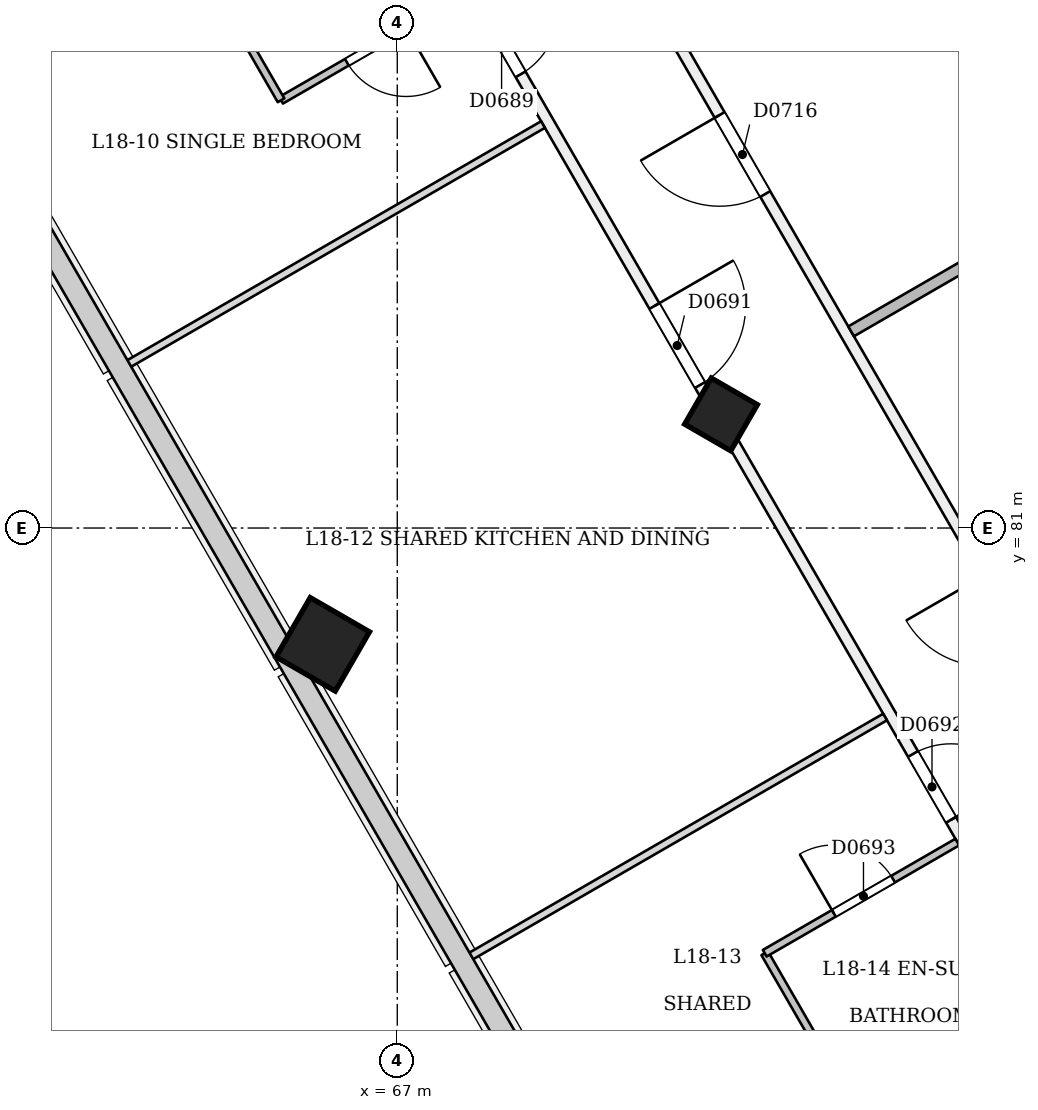
"""IFC4 building model, lengths in metres.
Left out: names, types, materials, properties, quantities, classifications, styles, units other than length and angle.
Written with IfcOpenShell. Run it as: python <this file> out.ifc"""

import sys

from ifc_helpers import new_model, si_unit, direction, frame, frame_2d, origin, origin_2d, place, context, subcontext, project, spatial, rectangle, extrude, element, fill, save


model = new_model("IFC4")
c1 = context("Model", 3, precision=1e-05, world=origin(), true_north=direction((0.0, 1.0)))
c2 = subcontext(c1, "Body", "Model", "MODEL_VIEW")
j1 = project(units=[si_unit("LENGTHUNIT", "METRE"), si_unit("PLANEANGLEUNIT", "RADIAN")], contexts=[c1])
p1 = place(None, origin())
s1 = spatial("IfcSite", under=j1, at=p1, CompositionType="ELEMENT")
p2 = place(p1, origin())
s2 = spatial("IfcBuilding", under=s1, at=p2, CompositionType="ELEMENT")
p3 = place(p2, frame((0.0, 0.0, 73.8)))
s3 = spatial("IfcBuildingStorey", under=s2, at=p3, CompositionType="ELEMENT", Elevation=73.8)
p4 = place(p3, frame((71.232, 82.448, -0.021), z_axis=(0.022222910879, 0.038415824599, 0.999014697916), x_axis=(-0.866021331072, -0.498527657424, 0.038434735731)))
e1 = element("IfcColumn", 1, at=p4, inside=s3, PredefinedType="COLUMN", context=c2, shape_type="SweptSolid", body=[
    extrude(rectangle(XDim=0.7, YDim=0.7, at=origin_2d()), origin(), (0.0, 0.0, 1.0), 3.604),
])
p5 = place(p3, frame((65.992, 79.422, -0.027), z_axis=(0.02222134892, 0.038480872521, 0.999012229206), x_axis=(-0.865639418776, -0.499186807044, 0.038482831667)))
e2 = element("IfcColumn", 2, at=p5, inside=s3, PredefinedType="COLUMN", context=c2, shape_type="SweptSolid", body=[
    extrude(rectangle(XDim=0.9, YDim=0.9, at=origin_2d()), origin(), (0.0, 0.0, 1.0), 3.604),
])
p6 = place(p3, frame((66.732, 90.242, 0.0), z_axis=(0.0, 0.0, 1.0), x_axis=(0.500004906105, -0.866022571225, 0.0)))
e3 = element("IfcWall", 3, at=p6, inside=s3, PredefinedType="PARTITIONING", context=c2, shape_type="SweptSolid", body=[
    extrude(rectangle(XDim=35.041, YDim=0.15, at=frame_2d((17.521, 0.0))), origin(), (0.0, 0.0, 1.0), 2.7),
])
p7 = place(p6, frame((2.78, 0.0, 0.0)))
e4 = element("IfcOpeningElement", 4, at=p7, cuts=e3, PredefinedType="OPENING", context=c2, shape_type="SweptSolid", body=[
    extrude(rectangle(XDim=1.0, YDim=2.1, at=frame_2d((0.5, 1.05))), frame((0.0, 0.085, 0.0), z_axis=(0.0, -1.0, 0.0), x_axis=(1.0, 0.0, 0.0)), (0.0, 0.0, 1.0), 0.171),
])
p8 = place(p6, frame((7.3, 0.0, 0.0)))
e5 = element("IfcOpeningElement", 5, at=p8, cuts=e3, PredefinedType="OPENING", context=c2, shape_type="SweptSolid", body=[
    extrude(rectangle(XDim=1.2, YDim=2.1, at=frame_2d((0.6, 1.05))), frame((0.0, 0.085, 0.0), z_axis=(0.0, -1.0, 0.0), x_axis=(1.0, 0.0, 0.0)), (0.0, 0.0, 1.0), 0.171),
])
p9 = place(p6, frame((14.105, 0.0, 0.0)))
e6 = element("IfcOpeningElement", 6, at=p9, cuts=e3, PredefinedType="OPENING", context=c2, shape_type="SweptSolid", body=[
    extrude(rectangle(XDim=1.0, YDim=2.1, at=frame_2d((0.5, 1.05))), frame((0.0, 0.085, 0.0), z_axis=(0.0, -1.0, 0.0), x_axis=(1.0, 0.0, 0.0)), (0.0, 0.0, 1.0), 0.171),
])
p10 = place(p6, frame((20.78, 0.0, 0.0)))
e7 = element("IfcOpeningElement", 7, at=p10, cuts=e3, PredefinedType="OPENING", context=c2, shape_type="SweptSolid", body=[
    extrude(rectangle(XDim=1.0, YDim=2.1, at=frame_2d((0.5, 1.05))), frame((0.0, 0.085, 0.0), z_axis=(0.0, -1.0, 0.0), x_axis=(1.0, 0.0, 0.0)), (0.0, 0.0, 1.0), 0.171),
])
p11 = place(p6, frame((24.25, 0.0, 0.0)))
e8 = element("IfcOpeningElement", 8, at=p11, cuts=e3, PredefinedType="OPENING", context=c2, shape_type="SweptSolid", body=[
    extrude(rectangle(XDim=1.0, YDim=2.1, at=frame_2d((0.5, 1.05))), frame((0.0, 0.085, 0.0), z_axis=(0.0, -1.0, 0.0), x_axis=(1.0, 0.0, 0.0)), (0.0, 0.0, 1.0), 0.171),
])
p12 = place(p6, frame((30.473, 0.0, 0.0)))
e9 = element("IfcOpeningElement", 9, at=p12, cuts=e3, PredefinedType="OPENING", context=c2, shape_type="SweptSolid", body=[
    extrude(rectangle(XDim=1.2, YDim=2.1, at=frame_2d((0.6, 1.05))), frame((0.0, 0.085, 0.0), z_axis=(0.0, -1.0, 0.0), x_axis=(1.0, 0.0, 0.0)), (0.0, 0.0, 1.0), 0.171),
])
p13 = place(p3, frame((85.0, 62.602, 0.0), z_axis=(0.0, 0.0, 1.0), x_axis=(-0.500002713669, 0.866023837041, 0.0)))
e10 = element("IfcWall", 10, at=p13, inside=s3, PredefinedType="PARTITIONING", context=c2, shape_type="SweptSolid", body=[
    extrude(rectangle(XDim=32.098, YDim=0.15, at=frame_2d((16.049, 0.0))), origin(), (0.0, 0.0, 1.0), 3.1),
])
p14 = place(p13, frame((19.332, 0.0, 0.0)))
e11 = element("IfcOpeningElement", 11, at=p14, cuts=e10, PredefinedType="OPENING", context=c2, shape_type="SweptSolid", body=[
    extrude(rectangle(XDim=1.2, YDim=2.1, at=frame_2d((0.6, 1.05))), frame((0.0, 0.085, 0.0), z_axis=(0.0, -1.0, 0.0), x_axis=(1.0, 0.0, 0.0)), (0.0, 0.0, 1.0), 0.171),
])
p15 = place(p13, frame((10.898, 0.0, 0.0)))
e12 = element("IfcOpeningElement", 12, at=p15, cuts=e10, PredefinedType="OPENING", context=c2, shape_type="SweptSolid", body=[
    extrude(rectangle(XDim=1.2, YDim=2.1, at=frame_2d((0.6, 1.05))), frame((0.0, 0.085, 0.0), z_axis=(0.0, -1.0, 0.0), x_axis=(1.0, 0.0, 0.0)), (0.0, 0.0, 1.0), 0.171),
])
p16 = place(p13, frame((26.318, 0.0, 0.0)))
e13 = element("IfcOpeningElement", 13, at=p16, cuts=e10, PredefinedType="OPENING", context=c2, shape_type="SweptSolid", body=[
    extrude(rectangle(XDim=1.2, YDim=2.1, at=frame_2d((0.6, 1.05))), frame((0.0, 0.085, 0.0), z_axis=(0.0, -1.0, 0.0), x_axis=(1.0, 0.0, 0.0)), (0.0, 0.0, 1.0), 0.171),
])
p17 = place(p13, frame((3.686, 0.0, 0.0)))
e14 = element("IfcOpeningElement", 14, at=p17, cuts=e10, PredefinedType="OPENING", context=c2, shape_type="SweptSolid", body=[
    extrude(rectangle(XDim=1.0, YDim=2.1, at=frame_2d((0.5, 1.05))), frame((0.0, 0.085, 0.0), z_axis=(0.0, -1.0, 0.0), x_axis=(1.0, 0.0, 0.0)), (0.0, 0.0, 1.0), 0.171),
])
p18 = place(p3, frame((61.19, 87.042, 0.0), z_axis=(0.0, 0.0, 1.0), x_axis=(0.866032430508, 0.49998782916, 0.0)))
e15 = element("IfcWall", 15, at=p18, inside=s3, PredefinedType="PARTITIONING", context=c2, shape_type="SweptSolid", body=[
    extrude(rectangle(XDim=2.92, YDim=0.15, at=frame_2d((1.46, 0.0))), origin(), (0.0, 0.0, 1.0), 2.6),
])
p19 = place(p3, frame((67.917, 88.04, 0.0), z_axis=(0.0, 0.0, 1.0), x_axis=(-0.866048868473, -0.499959355765, 0.0)))
e16 = element("IfcWall", 16, at=p19, inside=s3, PredefinedType="PARTITIONING", context=c2, shape_type="SweptSolid", body=[
    extrude(rectangle(XDim=2.825, YDim=0.1, at=frame_2d((1.413, 0.0))), origin(), (0.0, 0.0, 1.0), 3.1),
])
p20 = place(p19, frame((0.925, 0.0, 0.0)))
e17 = element("IfcOpeningElement", 17, at=p20, cuts=e16, PredefinedType="OPENING", context=c2, shape_type="SweptSolid", body=[
    extrude(rectangle(XDim=0.9, YDim=2.1, at=frame_2d((0.45, 1.05))), frame((0.0, 0.061, 0.0), z_axis=(0.0, -1.0, 0.0), x_axis=(1.0, 0.0, 0.0)), (0.0, 0.0, 1.0), 0.121),
])
p21 = place(p3, frame((65.471, 86.627, 0.0), z_axis=(0.0, 0.0, 1.0), x_axis=(-0.499987006516, 0.866032905446, 0.0)))
e18 = element("IfcWall", 18, at=p21, inside=s3, PredefinedType="PARTITIONING", context=c2, shape_type="SweptSolid", body=[
    extrude(rectangle(XDim=2.45, YDim=0.1, at=frame_2d((1.225, 0.0))), origin(), (0.0, 0.0, 1.0), 2.7),
])
for number, where, z_axis, x_axis in (
    (19, (63.422, 83.135, 0.0), (0.0, 0.0, 1.0), (0.866, 0.5, 0.0)),
    (20, (67.922, 75.341, 0.0), (0.0, 0.0, 1.0), (0.866, 0.5, 0.0)),
):
    element("IfcWall", number, at=place(p3, frame(where, z_axis=z_axis, x_axis=x_axis)), inside=s3, PredefinedType="PARTITIONING", context=c2, shape_type="SweptSolid", body=[
        extrude(rectangle(XDim=6.345, YDim=0.1, at=frame_2d((3.173, 0.0))), origin(), (0.0, 0.0, 1.0), 2.6),
    ])
p22 = place(p3, frame((73.097, 73.219, 0.0), z_axis=(0.0, 0.0, 1.0), x_axis=(-0.499976333282, 0.866039067339, 0.0)))
e21 = element("IfcWall", 21, at=p22, inside=s3, PredefinedType="PARTITIONING", context=c2, shape_type="SweptSolid", body=[
    extrude(rectangle(XDim=2.525, YDim=0.1, at=frame_2d((1.262, 0.0))), origin(), (0.0, 0.0, 1.0), 2.7),
])
p23 = place(p3, frame((71.834, 75.406, 0.0), z_axis=(0.0, 0.0, 1.0), x_axis=(0.866025730634, 0.499999433879, 0.0)))
e22 = element("IfcWall", 22, at=p23, inside=s3, PredefinedType="PARTITIONING", context=c2, shape_type="SweptSolid", body=[
    extrude(rectangle(XDim=2.925, YDim=0.1, at=frame_2d((1.462, 0.0))), origin(), (0.0, 0.0, 1.0), 3.1),
])
p24 = place(p23, frame((1.05, 0.0, 0.0)))
e23 = element("IfcOpeningElement", 23, at=p24, cuts=e22, PredefinedType="OPENING", context=c2, shape_type="SweptSolid", body=[
    extrude(rectangle(XDim=0.9, YDim=2.1, at=frame_2d((0.45, 1.05))), frame((0.0, 0.061, 0.0), z_axis=(0.0, -1.0, 0.0), x_axis=(1.0, 0.0, 0.0)), (0.0, 0.0, 1.0), 0.121),
])
p25 = place(p3, frame((73.221, 73.204, 0.0), z_axis=(0.0, 0.0, 1.0), x_axis=(0.866048868473, 0.499959355765, 0.0)))
e24 = element("IfcWall", 24, at=p25, inside=s3, PredefinedType="PARTITIONING", context=c2, shape_type="SweptSolid", body=[
    extrude(rectangle(XDim=2.825, YDim=0.1, at=frame_2d((1.413, 0.0))), origin(), (0.0, 0.0, 1.0), 2.7),
])
p26 = place(p3, frame((82.0, 88.8, 0.0), z_axis=(0.0, 0.0, 1.0), x_axis=(-0.866026874108, -0.499997453315, 0.0)))
e25 = element("IfcWall", 25, at=p26, inside=s3, PredefinedType="PARTITIONING", context=c2, shape_type="SweptSolid", body=[
    extrude(rectangle(XDim=10.426, YDim=0.15, at=frame_2d((5.213, 0.0))), origin(), (0.0, 0.0, 1.0), 3.1),
])
p27 = place(p7, origin())
e26 = element("IfcDoor", 26, at=p27, inside=s3, OperationType="SINGLE_SWING_LEFT", PredefinedType="NOTDEFINED", context=c2, shape_type="SweptSolid", body=[
    extrude(rectangle(XDim=1.0, YDim=2.1, at=frame_2d((0.5, 1.05))), frame((0.0, 0.025, 0.0), z_axis=(0.0, -1.0, 0.0), x_axis=(1.0, 0.0, 0.0)), (0.0, 0.0, 1.0), 0.05),
])
fill(e4, e26)
p28 = place(p20, origin())
e27 = element("IfcDoor", 27, at=p28, inside=s3, OperationType="SINGLE_SWING_LEFT", PredefinedType="NOTDEFINED", context=c2, shape_type="SweptSolid", body=[
    extrude(rectangle(XDim=0.9, YDim=2.1, at=frame_2d((0.45, 1.05))), frame((0.0, 0.025, 0.0), z_axis=(0.0, -1.0, 0.0), x_axis=(1.0, 0.0, 0.0)), (0.0, 0.0, 1.0), 0.05),
])
fill(e17, e27)
p29 = place(p8, origin())
e28 = element("IfcDoor", 28, at=p29, inside=s3, OperationType="SINGLE_SWING_LEFT", PredefinedType="NOTDEFINED", context=c2, shape_type="SweptSolid", body=[
    extrude(rectangle(XDim=1.2, YDim=2.1, at=frame_2d((0.6, 1.05))), frame((0.0, 0.025, 0.0), z_axis=(0.0, -1.0, 0.0), x_axis=(1.0, 0.0, 0.0)), (0.0, 0.0, 1.0), 0.05),
])
fill(e5, e28)
p30 = place(p9, origin())
e29 = element("IfcDoor", 29, at=p30, inside=s3, OperationType="SINGLE_SWING_RIGHT", PredefinedType="NOTDEFINED", context=c2, shape_type="SweptSolid", body=[
    extrude(rectangle(XDim=1.0, YDim=2.1, at=frame_2d((0.5, 1.05))), frame((0.0, 0.025, 0.0), z_axis=(0.0, -1.0, 0.0), x_axis=(1.0, 0.0, 0.0)), (0.0, 0.0, 1.0), 0.05),
])
fill(e6, e29)
p31 = place(p24, origin())
e30 = element("IfcDoor", 30, at=p31, inside=s3, OperationType="SINGLE_SWING_LEFT", PredefinedType="NOTDEFINED", context=c2, shape_type="SweptSolid", body=[
    extrude(rectangle(XDim=0.9, YDim=2.1, at=frame_2d((0.45, 1.05))), frame((0.0, 0.025, 0.0), z_axis=(0.0, -1.0, 0.0), x_axis=(1.0, 0.0, 0.0)), (0.0, 0.0, 1.0), 0.05),
])
fill(e23, e30)
p32 = place(p16, origin())
e31 = element("IfcDoor", 31, at=p32, inside=s3, OperationType="SINGLE_SWING_RIGHT", PredefinedType="NOTDEFINED", context=c2, shape_type="SweptSolid", body=[
    extrude(rectangle(XDim=1.2, YDim=2.1, at=frame_2d((0.6, 1.05))), frame((0.0, 0.025, 0.0), z_axis=(0.0, -1.0, 0.0), x_axis=(1.0, 0.0, 0.0)), (0.0, 0.0, 1.0), 0.05),
])
fill(e13, e31)
save(model, sys.argv[1])
